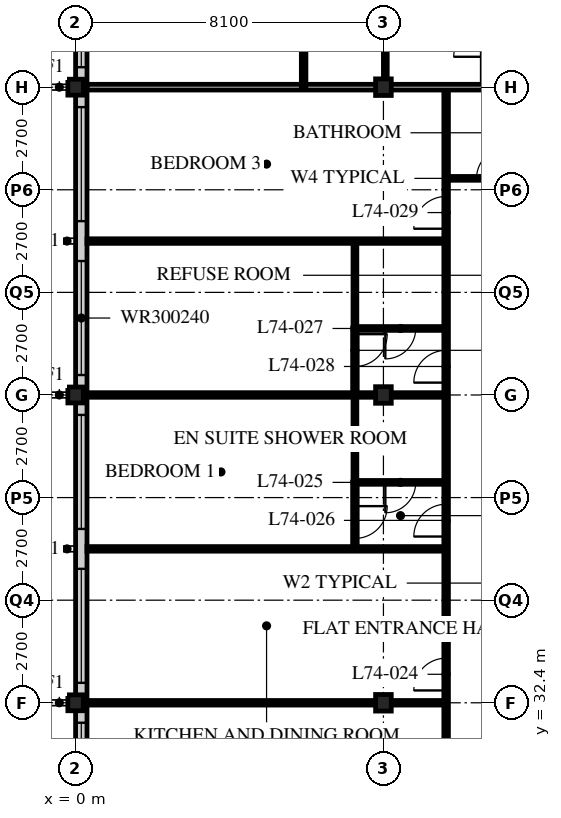
"""IFC4 building model, lengths in metres.
Left out: names, types, materials, properties, quantities, classifications, styles, units other than length and angle.
Written with IfcOpenShell. Run it as: python <this file> out.ifc"""

import sys

from ifc_helpers import new_model, si_unit, direction, frame, frame_2d, origin, origin_2d, place, context, subcontext, project, spatial, rectangle, i_section, extrude, element, fill, save


model = new_model("IFC4")
c1 = context("Model", 3, precision=1e-05, world=origin(), true_north=direction((0.0, 1.0)))
c2 = subcontext(c1, "Body", "Model", "MODEL_VIEW")
j1 = project(units=[si_unit("LENGTHUNIT", "METRE"), si_unit("PLANEANGLEUNIT", "RADIAN")], contexts=[c1])
p1 = place(None, origin())
s1 = spatial("IfcSite", under=j1, at=p1, CompositionType="ELEMENT")
p2 = place(p1, origin())
s2 = spatial("IfcBuilding", under=s1, at=p2, CompositionType="ELEMENT")
p3 = place(p2, frame((0.0, 0.0, 289.2)))
s3 = spatial("IfcBuildingStorey", under=s2, at=p3, CompositionType="ELEMENT", Elevation=289.2)
for number, where, z_axis, x_axis in (
    (1, (0.0, 32.4, 0.0), (0.0, 0.0, 1.0), (1.0, 0.0, 0.0)),
    (2, (0.0, 40.5, 0.0), (0.0, 0.0, 1.0), (1.0, 0.0, 0.0)),
    (3, (0.0, 48.6, 0.0), (0.0, 0.0, 1.0), (1.0, 0.0, 0.0)),
):
    element("IfcColumn", number, at=place(p3, frame(where, z_axis=z_axis, x_axis=x_axis)), inside=s3, PredefinedType="COLUMN", context=c2, shape_type="SweptSolid", body=[
        extrude(i_section(OverallWidth=0.407, OverallDepth=0.419, WebThickness=0.031, FlangeThickness=0.049, FilletRadius=0.015, at=origin_2d()), origin(), (0.0, 0.0, 1.0), 3.9),
    ])
for number, where, z_axis, x_axis in (
    (4, (8.1, 32.4, 0.0), (0.0, 0.0, 1.0), (1.0, 0.0, 0.0)),
    (5, (8.1, 40.5, 0.0), (0.0, 0.0, 1.0), (1.0, 0.0, 0.0)),
    (6, (8.1, 48.6, 0.0), (0.0, 0.0, 1.0), (1.0, 0.0, 0.0)),
):
    element("IfcColumn", number, at=place(p3, frame(where, z_axis=z_axis, x_axis=x_axis)), inside=s3, PredefinedType="COLUMN", context=c2, shape_type="SweptSolid", body=[
        extrude(i_section(OverallWidth=0.412, OverallDepth=0.437, WebThickness=0.036, FlangeThickness=0.058, FilletRadius=0.015, at=origin_2d()), origin(), (0.0, 0.0, 1.0), 3.9),
    ])
p4 = place(p3, frame((0.15, 56.4, 0.0), z_axis=(0.0, 0.0, 1.0), x_axis=(0.0, -1.0, 0.0)))
e7 = element("IfcWall", 7, at=p4, inside=s3, PredefinedType="SOLIDWALL", context=c2, shape_type="SweptSolid", body=[
    extrude(rectangle(XDim=32.1, YDim=0.3, at=frame_2d((16.05, 0.0))), origin(), (0.0, 0.0, 1.0), 3.69),
])
p5 = place(p4, frame((0.225, 0.0, 0.6)))
e8 = element("IfcOpeningElement", 8, at=p5, cuts=e7, PredefinedType="OPENING", context=c2, shape_type="SweptSolid", body=[
    extrude(rectangle(XDim=3.0, YDim=2.4, at=frame_2d((1.5, 1.2))), frame((0.0, 0.16, 0.0), z_axis=(0.0, -1.0, 0.0), x_axis=(1.0, 0.0, 0.0)), (0.0, 0.0, 1.0), 0.32),
])
p6 = place(p4, frame((4.275, 0.0, 0.6)))
e9 = element("IfcOpeningElement", 9, at=p6, cuts=e7, PredefinedType="OPENING", context=c2, shape_type="SweptSolid", body=[
    extrude(rectangle(XDim=3.0, YDim=2.4, at=frame_2d((1.5, 1.2))), frame((0.0, 0.16, 0.0), z_axis=(0.0, -1.0, 0.0), x_axis=(1.0, 0.0, 0.0)), (0.0, 0.0, 1.0), 0.32),
])
p7 = place(p4, frame((8.325, 0.0, 0.6)))
e10 = element("IfcOpeningElement", 10, at=p7, cuts=e7, PredefinedType="OPENING", context=c2, shape_type="SweptSolid", body=[
    extrude(rectangle(XDim=3.0, YDim=2.4, at=frame_2d((1.5, 1.2))), frame((0.0, 0.16, 0.0), z_axis=(0.0, -1.0, 0.0), x_axis=(1.0, 0.0, 0.0)), (0.0, 0.0, 1.0), 0.32),
])
p8 = place(p4, frame((12.375, 0.0, 0.6)))
e11 = element("IfcOpeningElement", 11, at=p8, cuts=e7, PredefinedType="OPENING", context=c2, shape_type="SweptSolid", body=[
    extrude(rectangle(XDim=3.0, YDim=2.4, at=frame_2d((1.5, 1.2))), frame((0.0, 0.16, 0.0), z_axis=(0.0, -1.0, 0.0), x_axis=(1.0, 0.0, 0.0)), (0.0, 0.0, 1.0), 0.32),
])
p9 = place(p4, frame((16.425, 0.0, 0.6)))
e12 = element("IfcOpeningElement", 12, at=p9, cuts=e7, PredefinedType="OPENING", context=c2, shape_type="SweptSolid", body=[
    extrude(rectangle(XDim=3.0, YDim=2.4, at=frame_2d((1.5, 1.2))), frame((0.0, 0.16, 0.0), z_axis=(0.0, -1.0, 0.0), x_axis=(1.0, 0.0, 0.0)), (0.0, 0.0, 1.0), 0.32),
])
p10 = place(p4, frame((20.475, 0.0, 0.6)))
e13 = element("IfcOpeningElement", 13, at=p10, cuts=e7, PredefinedType="OPENING", context=c2, shape_type="SweptSolid", body=[
    extrude(rectangle(XDim=3.0, YDim=2.4, at=frame_2d((1.5, 1.2))), frame((0.0, 0.16, 0.0), z_axis=(0.0, -1.0, 0.0), x_axis=(1.0, 0.0, 0.0)), (0.0, 0.0, 1.0), 0.32),
])
p11 = place(p4, frame((24.525, 0.0, 0.6)))
e14 = element("IfcOpeningElement", 14, at=p11, cuts=e7, PredefinedType="OPENING", context=c2, shape_type="SweptSolid", body=[
    extrude(rectangle(XDim=3.0, YDim=2.4, at=frame_2d((1.5, 1.2))), frame((0.0, 0.16, 0.0), z_axis=(0.0, -1.0, 0.0), x_axis=(1.0, 0.0, 0.0)), (0.0, 0.0, 1.0), 0.32),
])
p12 = place(p4, frame((28.575, 0.0, 0.6)))
e15 = element("IfcOpeningElement", 15, at=p12, cuts=e7, PredefinedType="OPENING", context=c2, shape_type="SweptSolid", body=[
    extrude(rectangle(XDim=3.0, YDim=2.4, at=frame_2d((1.5, 1.2))), frame((0.0, 0.16, 0.0), z_axis=(0.0, -1.0, 0.0), x_axis=(1.0, 0.0, 0.0)), (0.0, 0.0, 1.0), 0.32),
])
p13 = place(p3, frame((9.75, 22.5, 0.0), z_axis=(0.0, 0.0, 1.0), x_axis=(0.0, 1.0, 0.0)))
e16 = element("IfcWall", 16, at=p13, inside=s3, PredefinedType="PARTITIONING", context=c2, shape_type="SweptSolid", body=[
    extrude(rectangle(XDim=26.1, YDim=0.12, at=frame_2d((13.05, 0.0))), origin(), (0.0, 0.0, 1.0), 3.69),
])
p14 = place(p13, frame((0.975, 0.0, 0.0)))
e17 = element("IfcOpeningElement", 17, at=p14, cuts=e16, PredefinedType="OPENING", context=c2, shape_type="SweptSolid", body=[
    extrude(rectangle(XDim=0.85, YDim=2.1, at=frame_2d((0.425, 1.05))), frame((0.0, 0.07, 0.0), z_axis=(0.0, -1.0, 0.0), x_axis=(1.0, 0.0, 0.0)), (0.0, 0.0, 1.0), 0.14),
])
p15 = place(p13, frame((10.225, 0.0, 0.0)))
e18 = element("IfcOpeningElement", 18, at=p15, cuts=e16, PredefinedType="OPENING", context=c2, shape_type="SweptSolid", body=[
    extrude(rectangle(XDim=0.85, YDim=2.1, at=frame_2d((0.425, 1.05))), frame((0.0, 0.07, 0.0), z_axis=(0.0, -1.0, 0.0), x_axis=(1.0, 0.0, 0.0)), (0.0, 0.0, 1.0), 0.14),
])
p16 = place(p13, frame((14.275, 0.0, 0.0)))
e19 = element("IfcOpeningElement", 19, at=p16, cuts=e16, PredefinedType="OPENING", context=c2, shape_type="SweptSolid", body=[
    extrude(rectangle(XDim=0.85, YDim=2.1, at=frame_2d((0.425, 1.05))), frame((0.0, 0.07, 0.0), z_axis=(0.0, -1.0, 0.0), x_axis=(1.0, 0.0, 0.0)), (0.0, 0.0, 1.0), 0.14),
])
p17 = place(p13, frame((18.325, 0.0, 0.0)))
e20 = element("IfcOpeningElement", 20, at=p17, cuts=e16, PredefinedType="OPENING", context=c2, shape_type="SweptSolid", body=[
    extrude(rectangle(XDim=0.85, YDim=2.1, at=frame_2d((0.425, 1.05))), frame((0.0, 0.07, 0.0), z_axis=(0.0, -1.0, 0.0), x_axis=(1.0, 0.0, 0.0)), (0.0, 0.0, 1.0), 0.14),
])
p18 = place(p13, frame((22.375, 0.0, 0.0)))
e21 = element("IfcOpeningElement", 21, at=p18, cuts=e16, PredefinedType="OPENING", context=c2, shape_type="SweptSolid", body=[
    extrude(rectangle(XDim=0.85, YDim=2.1, at=frame_2d((0.425, 1.05))), frame((0.0, 0.07, 0.0), z_axis=(0.0, -1.0, 0.0), x_axis=(1.0, 0.0, 0.0)), (0.0, 0.0, 1.0), 0.14),
])
p19 = place(p3, frame((12.15, 46.2, 0.0), z_axis=(0.0, 0.0, 1.0), x_axis=(-1.0, 0.0, 0.0)))
e22 = element("IfcWall", 22, at=p19, inside=s3, PredefinedType="PARTITIONING", context=c2, shape_type="SweptSolid", body=[
    extrude(rectangle(XDim=2.4, YDim=0.1, at=frame_2d((1.2, 0.0))), origin(), (0.0, 0.0, 1.0), 3.69),
])
p20 = place(p19, frame((0.8, 0.0, 0.0)))
e23 = element("IfcOpeningElement", 23, at=p20, cuts=e22, PredefinedType="OPENING", context=c2, shape_type="SweptSolid", body=[
    extrude(rectangle(XDim=0.8, YDim=2.1, at=frame_2d((0.4, 1.05))), frame((0.0, 0.06, 0.0), z_axis=(0.0, -1.0, 0.0), x_axis=(1.0, 0.0, 0.0)), (0.0, 0.0, 1.0), 0.12),
])
p21 = place(p3, frame((9.75, 32.4, 0.0), z_axis=(0.0, 0.0, 1.0), x_axis=(-1.0, 0.0, 0.0)))
e24 = element("IfcWall", 24, at=p21, inside=s3, PredefinedType="PARTITIONING", context=c2, shape_type="SweptSolid", body=[
    extrude(rectangle(XDim=9.45, YDim=0.12, at=frame_2d((4.725, 0.0))), origin(), (0.0, 0.0, 1.0), 3.078),
])
p22 = place(p3, frame((9.75, 38.2, 0.0), z_axis=(0.0, 0.0, 1.0), x_axis=(-1.0, 0.0, 0.0)))
e25 = element("IfcWall", 25, at=p22, inside=s3, PredefinedType="PARTITIONING", context=c2, shape_type="SweptSolid", body=[
    extrude(rectangle(XDim=2.4, YDim=0.1, at=frame_2d((1.2, 0.0))), origin(), (0.0, 0.0, 1.0), 3.69),
])
p23 = place(p22, frame((0.8, 0.0, 0.0)))
e26 = element("IfcOpeningElement", 26, at=p23, cuts=e25, PredefinedType="OPENING", context=c2, shape_type="SweptSolid", body=[
    extrude(rectangle(XDim=0.8, YDim=2.1, at=frame_2d((0.4, 1.05))), frame((0.0, 0.06, 0.0), z_axis=(0.0, -1.0, 0.0), x_axis=(1.0, 0.0, 0.0)), (0.0, 0.0, 1.0), 0.12),
])
p24 = place(p3, frame((7.35, 38.2, 0.0), z_axis=(0.0, 0.0, 1.0), x_axis=(0.0, 1.0, 0.0)))
e27 = element("IfcWall", 27, at=p24, inside=s3, PredefinedType="PARTITIONING", context=c2, shape_type="SweptSolid", body=[
    extrude(rectangle(XDim=2.3, YDim=0.1, at=frame_2d((1.15, 0.0))), origin(), (0.0, 0.0, 1.0), 3.69),
])
p25 = place(p3, frame((9.75, 36.45, 0.0), z_axis=(0.0, 0.0, 1.0), x_axis=(-1.0, 0.0, 0.0)))
e28 = element("IfcWall", 28, at=p25, inside=s3, PredefinedType="PARTITIONING", context=c2, shape_type="SweptSolid", body=[
    extrude(rectangle(XDim=9.45, YDim=0.12, at=frame_2d((4.725, 0.0))), origin(), (0.0, 0.0, 1.0), 3.69),
])
p26 = place(p3, frame((9.75, 42.25, 0.0), z_axis=(0.0, 0.0, 1.0), x_axis=(-1.0, 0.0, 0.0)))
e29 = element("IfcWall", 29, at=p26, inside=s3, PredefinedType="PARTITIONING", context=c2, shape_type="SweptSolid", body=[
    extrude(rectangle(XDim=2.4, YDim=0.1, at=frame_2d((1.2, 0.0))), origin(), (0.0, 0.0, 1.0), 3.69),
])
p27 = place(p26, frame((0.8, 0.0, 0.0)))
e30 = element("IfcOpeningElement", 30, at=p27, cuts=e29, PredefinedType="OPENING", context=c2, shape_type="SweptSolid", body=[
    extrude(rectangle(XDim=0.8, YDim=2.1, at=frame_2d((0.4, 1.05))), frame((0.0, 0.06, 0.0), z_axis=(0.0, -1.0, 0.0), x_axis=(1.0, 0.0, 0.0)), (0.0, 0.0, 1.0), 0.12),
])
p28 = place(p3, frame((7.35, 42.25, 0.0), z_axis=(0.0, 0.0, 1.0), x_axis=(0.0, 1.0, 0.0)))
e31 = element("IfcWall", 31, at=p28, inside=s3, PredefinedType="PARTITIONING", context=c2, shape_type="SweptSolid", body=[
    extrude(rectangle(XDim=2.3, YDim=0.1, at=frame_2d((1.15, 0.0))), origin(), (0.0, 0.0, 1.0), 3.69),
])
p29 = place(p3, frame((9.75, 40.5, 0.0), z_axis=(0.0, 0.0, 1.0), x_axis=(-1.0, 0.0, 0.0)))
e32 = element("IfcWall", 32, at=p29, inside=s3, PredefinedType="PARTITIONING", context=c2, shape_type="SweptSolid", body=[
    extrude(rectangle(XDim=9.45, YDim=0.12, at=frame_2d((4.725, 0.0))), origin(), (0.0, 0.0, 1.0), 3.078),
])
p30 = place(p3, frame((9.75, 44.55, 0.0), z_axis=(0.0, 0.0, 1.0), x_axis=(-1.0, 0.0, 0.0)))
e33 = element("IfcWall", 33, at=p30, inside=s3, PredefinedType="PARTITIONING", context=c2, shape_type="SweptSolid", body=[
    extrude(rectangle(XDim=9.45, YDim=0.12, at=frame_2d((4.725, 0.0))), origin(), (0.0, 0.0, 1.0), 3.69),
])
p31 = place(p3, frame((8.15, 48.6, 0.0), z_axis=(0.0, 0.0, 1.0), x_axis=(0.0, 1.0, 0.0)))
e34 = element("IfcWall", 34, at=p31, inside=s3, PredefinedType="PARTITIONING", context=c2, shape_type="SweptSolid", body=[
    extrude(rectangle(XDim=2.4, YDim=0.1, at=frame_2d((1.2, 0.0))), origin(), (0.0, 0.0, 1.0), 3.078),
])
p32 = place(p3, frame((0.3, 48.6, 0.0), z_axis=(0.0, 0.0, 1.0), x_axis=(1.0, 0.0, 0.0)))
e35 = element("IfcWall", 35, at=p32, inside=s3, PredefinedType="PARTITIONING", context=c2, shape_type="SweptSolid", body=[
    extrude(rectangle(XDim=11.85, YDim=0.15, at=frame_2d((5.925, 0.0))), origin(), (0.0, 0.0, 1.0), 3.078),
])
p33 = place(p3, frame((7.35, 36.45, 0.0), z_axis=(0.0, 0.0, 1.0), x_axis=(0.0, 1.0, 0.0)))
e36 = element("IfcWall", 36, at=p33, inside=s3, PredefinedType="PARTITIONING", context=c2, shape_type="SweptSolid", body=[
    extrude(rectangle(XDim=1.76, YDim=0.12, at=frame_2d((0.88, 0.0))), origin(), (0.0, 0.0, 1.0), 3.69),
])
p34 = place(p33, frame((0.275, 0.0, 0.0)))
e37 = element("IfcOpeningElement", 37, at=p34, cuts=e36, PredefinedType="OPENING", context=c2, shape_type="SweptSolid", body=[
    extrude(rectangle(XDim=0.85, YDim=2.1, at=frame_2d((0.425, 1.05))), frame((0.0, 0.07, 0.0), z_axis=(0.0, -1.0, 0.0), x_axis=(1.0, 0.0, 0.0)), (0.0, 0.0, 1.0), 0.14),
])
p35 = place(p3, frame((7.35, 40.5, 0.0), z_axis=(0.0, 0.0, 1.0), x_axis=(0.0, 1.0, 0.0)))
e38 = element("IfcWall", 38, at=p35, inside=s3, PredefinedType="PARTITIONING", context=c2, shape_type="SweptSolid", body=[
    extrude(rectangle(XDim=1.76, YDim=0.12, at=frame_2d((0.88, 0.0))), origin(), (0.0, 0.0, 1.0), 3.69),
])
p36 = place(p35, frame((0.75, 0.0, 0.0)))
e39 = element("IfcOpeningElement", 39, at=p36, cuts=e38, PredefinedType="OPENING", context=c2, shape_type="SweptSolid", body=[
    extrude(rectangle(XDim=0.85, YDim=2.1, at=frame_2d((0.425, 1.05))), frame((0.0, 0.07, 0.0), z_axis=(0.0, -1.0, 0.0), x_axis=(1.0, 0.0, 0.0)), (0.0, 0.0, 1.0), 0.14),
])
p37 = place(p3, frame((6.0, 48.6, 0.0), z_axis=(0.0, 0.0, 1.0), x_axis=(0.0, 1.0, 0.0)))
e40 = element("IfcWall", 40, at=p37, inside=s3, PredefinedType="PARTITIONING", context=c2, shape_type="SweptSolid", body=[
    extrude(rectangle(XDim=11.85, YDim=0.12, at=frame_2d((5.925, 0.0))), origin(), (0.0, 0.0, 1.0), 3.69),
])
p38 = place(p37, frame((5.5, 0.0, 0.0)))
e41 = element("IfcOpeningElement", 41, at=p38, cuts=e40, PredefinedType="OPENING", context=c2, shape_type="SweptSolid", body=[
    extrude(rectangle(XDim=0.85, YDim=2.1, at=frame_2d((0.425, 1.05))), frame((0.0, 0.07, 0.0), z_axis=(0.0, -1.0, 0.0), x_axis=(1.0, 0.0, 0.0)), (0.0, 0.0, 1.0), 0.14),
])
p39 = place(p6, origin())
e42 = element("IfcWindow", 42, at=p39, inside=s3, PartitioningType="SINGLE_PANEL", PredefinedType="WINDOW", context=c2, shape_type="SweptSolid", body=[
    extrude(rectangle(XDim=3.0, YDim=2.4, at=frame_2d((1.5, 1.2))), frame((0.0, 0.03, 0.0), z_axis=(0.0, -1.0, 0.0), x_axis=(1.0, 0.0, 0.0)), (0.0, 0.0, 1.0), 0.06),
])
fill(e9, e42)
p40 = place(p7, origin())
e43 = element("IfcWindow", 43, at=p40, inside=s3, PartitioningType="SINGLE_PANEL", PredefinedType="WINDOW", context=c2, shape_type="SweptSolid", body=[
    extrude(rectangle(XDim=3.0, YDim=2.4, at=frame_2d((1.5, 1.2))), frame((0.0, 0.03, 0.0), z_axis=(0.0, -1.0, 0.0), x_axis=(1.0, 0.0, 0.0)), (0.0, 0.0, 1.0), 0.06),
])
fill(e10, e43)
p41 = place(p8, origin())
e44 = element("IfcWindow", 44, at=p41, inside=s3, PartitioningType="SINGLE_PANEL", PredefinedType="WINDOW", context=c2, shape_type="SweptSolid", body=[
    extrude(rectangle(XDim=3.0, YDim=2.4, at=frame_2d((1.5, 1.2))), frame((0.0, 0.03, 0.0), z_axis=(0.0, -1.0, 0.0), x_axis=(1.0, 0.0, 0.0)), (0.0, 0.0, 1.0), 0.06),
])
fill(e11, e44)
p42 = place(p9, origin())
e45 = element("IfcWindow", 45, at=p42, inside=s3, PartitioningType="SINGLE_PANEL", PredefinedType="WINDOW", context=c2, shape_type="SweptSolid", body=[
    extrude(rectangle(XDim=3.0, YDim=2.4, at=frame_2d((1.5, 1.2))), frame((0.0, 0.03, 0.0), z_axis=(0.0, -1.0, 0.0), x_axis=(1.0, 0.0, 0.0)), (0.0, 0.0, 1.0), 0.06),
])
fill(e12, e45)
p43 = place(p10, origin())
e46 = element("IfcWindow", 46, at=p43, inside=s3, PartitioningType="SINGLE_PANEL", PredefinedType="WINDOW", context=c2, shape_type="SweptSolid", body=[
    extrude(rectangle(XDim=3.0, YDim=2.4, at=frame_2d((1.5, 1.2))), frame((0.0, 0.03, 0.0), z_axis=(0.0, -1.0, 0.0), x_axis=(1.0, 0.0, 0.0)), (0.0, 0.0, 1.0), 0.06),
])
fill(e13, e46)
p44 = place(p11, origin())
e47 = element("IfcWindow", 47, at=p44, inside=s3, PartitioningType="SINGLE_PANEL", PredefinedType="WINDOW", context=c2, shape_type="SweptSolid", body=[
    extrude(rectangle(XDim=3.0, YDim=2.4, at=frame_2d((1.5, 1.2))), frame((0.0, 0.03, 0.0), z_axis=(0.0, -1.0, 0.0), x_axis=(1.0, 0.0, 0.0)), (0.0, 0.0, 1.0), 0.06),
])
fill(e14, e47)
p45 = place(p20, origin())
e48 = element("IfcDoor", 48, at=p45, inside=s3, OperationType="SINGLE_SWING_RIGHT", PredefinedType="DOOR", context=c2, shape_type="SweptSolid", body=[
    extrude(rectangle(XDim=0.8, YDim=2.1, at=frame_2d((0.4, 1.05))), frame((0.0, 0.025, 0.0), z_axis=(0.0, -1.0, 0.0), x_axis=(1.0, 0.0, 0.0)), (0.0, 0.0, 1.0), 0.05),
])
fill(e23, e48)
p46 = place(p15, origin())
e49 = element("IfcDoor", 49, at=p46, inside=s3, OperationType="SINGLE_SWING_LEFT", PredefinedType="DOOR", context=c2, shape_type="SweptSolid", body=[
    extrude(rectangle(XDim=0.85, YDim=2.1, at=frame_2d((0.425, 1.05))), frame((0.0, 0.025, 0.0), z_axis=(0.0, -1.0, 0.0), x_axis=(1.0, 0.0, 0.0)), (0.0, 0.0, 1.0), 0.05),
])
fill(e18, e49)
p47 = place(p23, origin())
e50 = element("IfcDoor", 50, at=p47, inside=s3, OperationType="SINGLE_SWING_RIGHT", PredefinedType="DOOR", context=c2, shape_type="SweptSolid", body=[
    extrude(rectangle(XDim=0.8, YDim=2.1, at=frame_2d((0.4, 1.05))), frame((0.0, 0.025, 0.0), z_axis=(0.0, -1.0, 0.0), x_axis=(1.0, 0.0, 0.0)), (0.0, 0.0, 1.0), 0.05),
])
fill(e26, e50)
p48 = place(p16, origin())
e51 = element("IfcDoor", 51, at=p48, inside=s3, OperationType="SINGLE_SWING_LEFT", PredefinedType="DOOR", context=c2, shape_type="SweptSolid", body=[
    extrude(rectangle(XDim=0.85, YDim=2.1, at=frame_2d((0.425, 1.05))), frame((0.0, 0.025, 0.0), z_axis=(0.0, -1.0, 0.0), x_axis=(1.0, 0.0, 0.0)), (0.0, 0.0, 1.0), 0.05),
])
fill(e19, e51)
p49 = place(p27, origin())
e52 = element("IfcDoor", 52, at=p49, inside=s3, OperationType="SINGLE_SWING_RIGHT", PredefinedType="DOOR", context=c2, shape_type="SweptSolid", body=[
    extrude(rectangle(XDim=0.8, YDim=2.1, at=frame_2d((0.4, 1.05))), frame((0.0, 0.025, 0.0), z_axis=(0.0, -1.0, 0.0), x_axis=(1.0, 0.0, 0.0)), (0.0, 0.0, 1.0), 0.05),
])
fill(e30, e52)
p50 = place(p17, origin())
e53 = element("IfcDoor", 53, at=p50, inside=s3, OperationType="SINGLE_SWING_LEFT", PredefinedType="DOOR", context=c2, shape_type="SweptSolid", body=[
    extrude(rectangle(XDim=0.85, YDim=2.1, at=frame_2d((0.425, 1.05))), frame((0.0, 0.025, 0.0), z_axis=(0.0, -1.0, 0.0), x_axis=(1.0, 0.0, 0.0)), (0.0, 0.0, 1.0), 0.05),
])
fill(e20, e53)
p51 = place(p18, origin())
e54 = element("IfcDoor", 54, at=p51, inside=s3, OperationType="SINGLE_SWING_LEFT", PredefinedType="DOOR", context=c2, shape_type="SweptSolid", body=[
    extrude(rectangle(XDim=0.85, YDim=2.1, at=frame_2d((0.425, 1.05))), frame((0.0, 0.025, 0.0), z_axis=(0.0, -1.0, 0.0), x_axis=(1.0, 0.0, 0.0)), (0.0, 0.0, 1.0), 0.05),
])
fill(e21, e54)
p52 = place(p34, origin())
e55 = element("IfcDoor", 55, at=p52, inside=s3, OperationType="SINGLE_SWING_LEFT", PredefinedType="DOOR", context=c2, shape_type="SweptSolid", body=[
    extrude(rectangle(XDim=0.85, YDim=2.1, at=frame_2d((0.425, 1.05))), frame((0.0, 0.025, 0.0), z_axis=(0.0, -1.0, 0.0), x_axis=(1.0, 0.0, 0.0)), (0.0, 0.0, 1.0), 0.05),
])
fill(e37, e55)
p53 = place(p36, origin())
e56 = element("IfcDoor", 56, at=p53, inside=s3, OperationType="SINGLE_SWING_LEFT", PredefinedType="DOOR", context=c2, shape_type="SweptSolid", body=[
    extrude(rectangle(XDim=0.85, YDim=2.1, at=frame_2d((0.425, 1.05))), frame((0.0, 0.025, 0.0), z_axis=(0.0, -1.0, 0.0), x_axis=(1.0, 0.0, 0.0)), (0.0, 0.0, 1.0), 0.05),
])
fill(e39, e56)
save(model, sys.argv[1])
